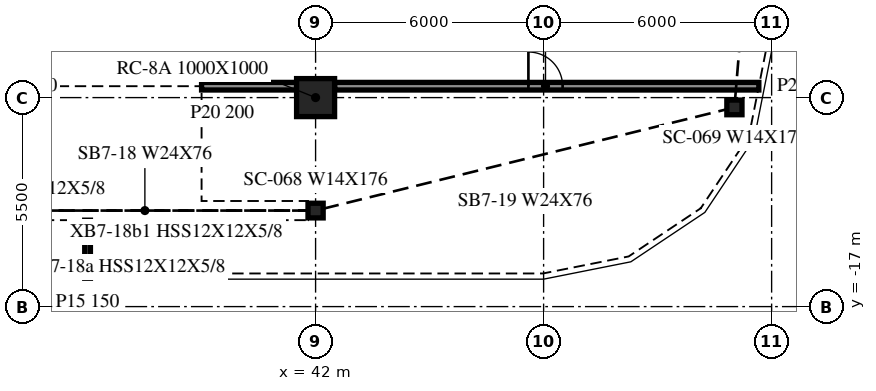
"""IFC4 building model, lengths in metres.
Left out: names, types, materials, properties, quantities, classifications, styles, units other than length and angle.
Written with IfcOpenShell. Run it as: python <this file> out.ifc"""

import sys

from ifc_helpers import new_model, si_unit, direction, frame, frame_2d, origin, origin_2d, place, context, subcontext, project, spatial, rectangle, i_section, extrude, element, fill, save


model = new_model("IFC4")
c1 = context("Model", 3, precision=1e-05, world=origin(), true_north=direction((0.0, 1.0)))
c2 = subcontext(c1, "Body", "Model", "MODEL_VIEW")
j1 = project(units=[si_unit("LENGTHUNIT", "METRE"), si_unit("PLANEANGLEUNIT", "RADIAN")], contexts=[c1])
p1 = place(None, origin())
s1 = spatial("IfcSite", under=j1, at=p1, CompositionType="ELEMENT")
p2 = place(p1, origin())
s2 = spatial("IfcBuilding", under=s1, at=p2, CompositionType="ELEMENT")
p3 = place(p2, frame((0.0, 0.0, 236.2)))
s3 = spatial("IfcBuildingStorey", under=s2, at=p3, CompositionType="ELEMENT", Elevation=236.2)
p4 = place(p3, frame((42.0, -11.5, -0.34), z_axis=(0.0, 0.0, 1.0), x_axis=(1.0, 0.0, 0.0)))
e1 = element("IfcColumn", 1, at=p4, inside=s3, PredefinedType="COLUMN", context=c2, shape_type="SweptSolid", body=[
    extrude(rectangle(XDim=1.0, YDim=1.0, at=origin_2d()), origin(), (0.0, 0.0, 1.0), 3.8),
])
for number, where, z_axis, x_axis in (
    (2, (42.0, -14.473, -0.34), (0.0, 0.0, 1.0), (1.0, 0.0, 0.0)),
    (3, (53.021, -11.758, -0.34), (0.0, 0.0, 1.0), (1.0, 0.0, 0.0)),
):
    element("IfcColumn", number, at=place(p3, frame(where, z_axis=z_axis, x_axis=x_axis)), inside=s3, PredefinedType="COLUMN", context=c2, shape_type="SweptSolid", body=[
        extrude(i_section(OverallWidth=0.399, OverallDepth=0.386, WebThickness=0.021, FlangeThickness=0.033, at=origin_2d()), origin(), (0.0, 0.0, 1.0), 3.8),
    ])
p5 = place(p3, frame((39.0, -11.2, 0.0), z_axis=(0.0, 0.0, 1.0), x_axis=(1.0, 0.0, 0.0)))
e4 = element("IfcWall", 4, at=p5, inside=s3, PredefinedType="PARTITIONING", context=c2, shape_type="SweptSolid", body=[
    extrude(rectangle(XDim=2.5, YDim=0.2, at=frame_2d((1.25, 0.0))), origin(), (0.0, 0.0, 1.0), 3.46),
])
p6 = place(p3, frame((42.5, -11.2, 0.0), z_axis=(0.0, 0.0, 1.0), x_axis=(1.0, 0.0, 0.0)))
e5 = element("IfcWall", 5, at=p6, inside=s3, PredefinedType="PARTITIONING", context=c2, shape_type="SweptSolid", body=[
    extrude(rectangle(XDim=11.164, YDim=0.2, at=frame_2d((5.582, 0.0))), origin(), (0.0, 0.0, 1.0), 3.46),
])
p7 = place(p6, frame((5.1, 0.0, 0.0)))
e6 = element("IfcOpeningElement", 6, at=p7, cuts=e5, PredefinedType="OPENING", context=c2, shape_type="SweptSolid", body=[
    extrude(rectangle(XDim=0.9, YDim=2.1, at=frame_2d((0.45, 1.05))), frame((0.0, 0.11, 0.0), z_axis=(0.0, -1.0, 0.0), x_axis=(1.0, 0.0, 0.0)), (0.0, 0.0, 1.0), 0.22),
])
p8 = place(p3, frame((36.0, -16.253, 0.0), z_axis=(0.0, 0.0, 1.0), x_axis=(0.0, 1.0, 0.0)))
e7 = element("IfcWall", 7, at=p8, inside=s3, PredefinedType="PARTITIONING", context=c2, shape_type="SweptSolid", body=[
    extrude(rectangle(XDim=1.528, YDim=0.15, at=frame_2d((0.764, 0.0))), origin(), (0.0, 0.0, 1.0), 3.46),
])
p9 = place(p7, origin())
e8 = element("IfcDoor", 8, at=p9, inside=s3, OperationType="SINGLE_SWING_RIGHT", PredefinedType="DOOR", context=c2, shape_type="SweptSolid", body=[
    extrude(rectangle(XDim=0.9, YDim=2.1, at=frame_2d((0.45, 1.05))), frame((0.0, 0.025, 0.0), z_axis=(0.0, -1.0, 0.0), x_axis=(1.0, 0.0, 0.0)), (0.0, 0.0, 1.0), 0.05),
])
fill(e6, e8)
save(model, sys.argv[1])
